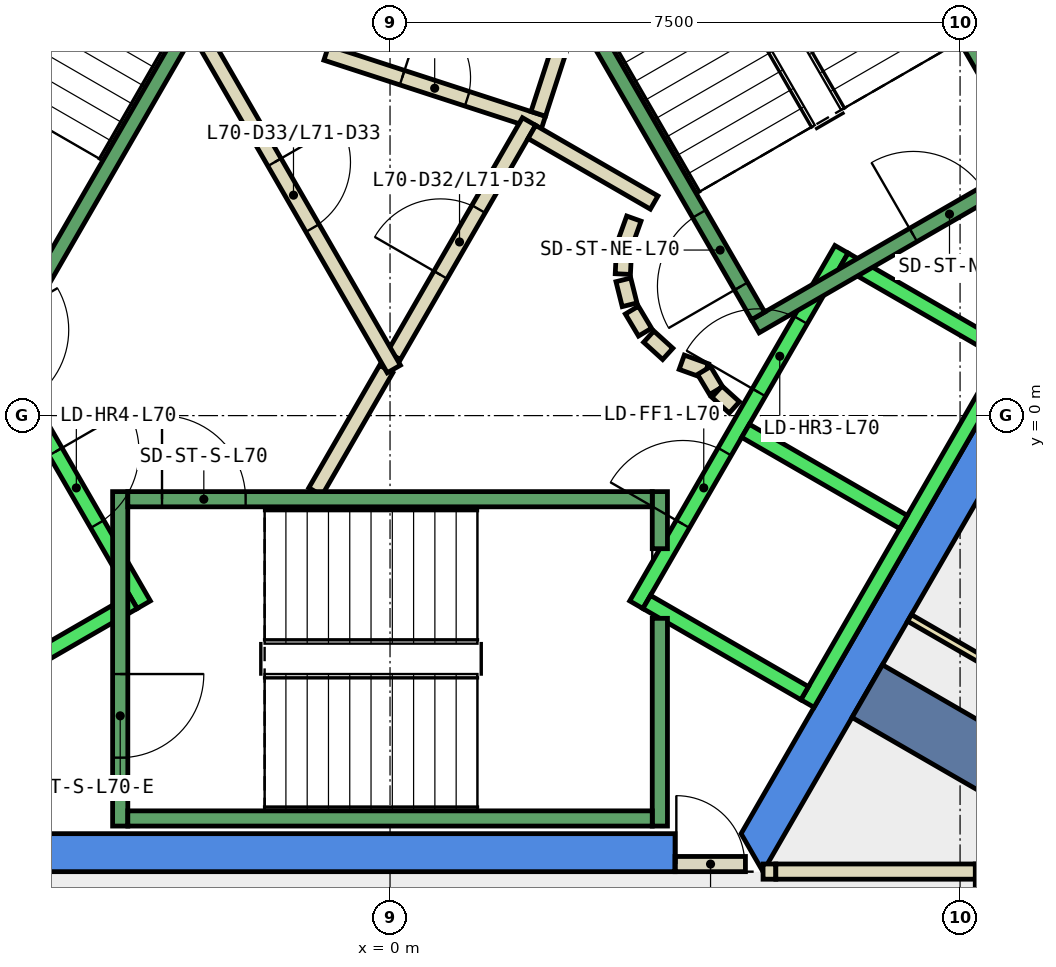
"""IFC4 building model, lengths in metres.
Left out: names, types, materials, properties, quantities, classifications, styles, units other than length and angle.
Written with IfcOpenShell. Run it as: python <this file> out.ifc"""

import sys

from ifc_helpers import new_model, si_unit, direction, frame, frame_2d, origin, place, context, subcontext, project, spatial, polyline, rectangle, outline, extrude, element, fill, save


model = new_model("IFC4")
c1 = context("Model", 3, precision=1e-05, world=origin(), true_north=direction((0.0, 1.0)))
c2 = subcontext(c1, "Body", "Model", "MODEL_VIEW")
j1 = project(units=[si_unit("LENGTHUNIT", "METRE"), si_unit("PLANEANGLEUNIT", "RADIAN")], contexts=[c1])
p1 = place(None, origin())
s1 = spatial("IfcSite", under=j1, at=p1, CompositionType="ELEMENT")
p2 = place(p1, origin())
s2 = spatial("IfcBuilding", under=s1, at=p2, CompositionType="ELEMENT")
p3 = place(p2, frame((0.0, 0.0, 300.8)))
s3 = spatial("IfcBuildingStorey", under=s2, at=p3, CompositionType="ELEMENT", Elevation=300.8)
p4 = place(p3, frame((0.0, 0.0, -0.34)))
e1 = element("IfcWall", 1, at=p4, inside=s3, PredefinedType="SHEAR", context=c2, shape_type="SweptSolid", body=[
    extrude(outline(polyline([(5.486, 9.998), (5.053, 9.748), (9.238, 2.5), (9.815, 2.5), (5.486, 9.998)])), origin(), (0.0, 0.0, 1.0), 3.6),
])
p5 = place(p3, frame((0.0, 0.0, -0.34)))
e2 = element("IfcWall", 2, at=p5, inside=s3, PredefinedType="SHEAR", context=c2, shape_type="SweptSolid", body=[
    extrude(outline(polyline([(3.75, -6.0), (3.75, -5.5), (-4.619, -5.5), (-4.907, -6.0), (3.75, -6.0)])), origin(), (0.0, 0.0, 1.0), 3.6),
])
p6 = place(p3, frame((0.0, 0.0, -0.34)))
e3 = element("IfcWall", 3, at=p6, inside=s3, PredefinedType="SHEAR", context=c2, shape_type="SweptSolid", body=[
    extrude(outline(polyline([(4.907, -6.0), (9.815, 2.5), (9.238, 2.5), (4.619, -5.5), (4.907, -6.0)])), origin(), (0.0, 0.0, 1.0), 3.6),
])
p7 = place(p3, frame((6.279, -3.625, -0.34), z_axis=(0.0, 0.0, 1.0), x_axis=(0.866017533419, -0.500013631625, 0.0)))
e4 = element("IfcWall", 4, at=p7, inside=s3, PredefinedType="SHEAR", context=c2, shape_type="SweptSolid", body=[
    extrude(rectangle(XDim=9.0, YDim=0.8, at=frame_2d((4.5, 0.0))), origin(), (0.0, 0.0, 1.0), 3.6),
])
p8 = place(p3, frame((-0.839, 4.771, 0.0), z_axis=(0.0, 0.0, 1.0), x_axis=(0.950961084355, -0.309310549515, 0.0)))
e5 = element("IfcWall", 5, at=p8, inside=s3, PredefinedType="PARTITIONING", context=c2, shape_type="SweptSolid", body=[
    extrude(rectangle(XDim=3.0, YDim=0.2, at=frame_2d((1.5, 0.0))), origin(), (0.0, 0.0, 1.0), 3.26),
])
p9 = place(p8, frame((1.05, 0.0, 0.0)))
e6 = element("IfcOpeningElement", 6, at=p9, cuts=e5, PredefinedType="OPENING", context=c2, shape_type="SweptSolid", body=[
    extrude(rectangle(XDim=0.9, YDim=2.1, at=frame_2d((0.45, 1.05))), frame((0.0, 0.11, 0.0), z_axis=(0.0, -1.0, 0.0), x_axis=(1.0, 0.0, 0.0)), (0.0, 0.0, 1.0), 0.22),
])
p10 = place(p3, frame((1.95, 3.97, 0.0), z_axis=(0.0, 0.0, 1.0), x_axis=(0.308583003896, 0.951197418892, 0.0)))
e7 = element("IfcWall", 7, at=p10, inside=s3, PredefinedType="PARTITIONING", context=c2, shape_type="SweptSolid", body=[
    extrude(rectangle(XDim=1.449, YDim=0.2, at=frame_2d((0.724, 0.0))), origin(), (0.0, 0.0, 1.0), 3.26),
])
p11 = place(p3, frame((-0.982, -1.0, 0.0), z_axis=(0.0, 0.0, 1.0), x_axis=(0.50024047865, 0.865886518847, 0.0)))
e8 = element("IfcWall", 8, at=p11, inside=s3, PredefinedType="PARTITIONING", context=c2, shape_type="SweptSolid", body=[
    extrude(rectangle(XDim=1.863, YDim=0.2, at=frame_2d((0.931, 0.0))), origin(), (0.0, 0.0, 1.0), 3.26),
])
p12 = place(p3, frame((0.05, 0.787, 0.0), z_axis=(0.0, 0.0, 1.0), x_axis=(0.499954076797, 0.866051915934, 0.0)))
e9 = element("IfcWall", 9, at=p12, inside=s3, PredefinedType="PARTITIONING", context=c2, shape_type="SweptSolid", body=[
    extrude(rectangle(XDim=3.558, YDim=0.2, at=frame_2d((1.779, 0.0))), origin(), (0.0, 0.0, 1.0), 3.26),
])
p13 = place(p12, frame((1.229, 0.0, 0.0)))
e10 = element("IfcOpeningElement", 10, at=p13, cuts=e9, PredefinedType="OPENING", context=c2, shape_type="SweptSolid", body=[
    extrude(rectangle(XDim=1.0, YDim=2.1, at=frame_2d((0.5, 1.05))), frame((0.0, 0.11, 0.0), z_axis=(0.0, -1.0, 0.0), x_axis=(1.0, 0.0, 0.0)), (0.0, 0.0, 1.0), 0.22),
])
p14 = place(p3, frame((1.866, 3.732, 0.0), z_axis=(0.0, 0.0, 1.0), x_axis=(0.866043361281, -0.499968895414, 0.0)))
e11 = element("IfcWall", 11, at=p14, inside=s3, PredefinedType="PARTITIONING", context=c2, shape_type="SweptSolid", body=[
    extrude(rectangle(XDim=1.858, YDim=0.2, at=frame_2d((0.929, 0.0))), origin(), (0.0, 0.0, 1.0), 3.26),
])
p15 = place(p3, frame((3.208, 2.592, 0.0), z_axis=(0.0, 0.0, 1.0), x_axis=(-0.337388820924, -0.941365382578, 0.0)))
e12 = element("IfcWall", 12, at=p15, inside=s3, PredefinedType="PARTITIONING", context=c2, shape_type="SweptSolid", body=[
    extrude(rectangle(XDim=0.338, YDim=0.2, at=frame_2d((0.169, 0.0))), origin(), (0.0, 0.0, 1.0), 3.26),
])
p16 = place(p3, frame((3.079, 2.199, 0.0), z_axis=(0.0, 0.0, 1.0), x_axis=(-0.047771483479, -0.998858290933, 0.0)))
e13 = element("IfcWall", 13, at=p16, inside=s3, PredefinedType="PARTITIONING", context=c2, shape_type="SweptSolid", body=[
    extrude(rectangle(XDim=0.337, YDim=0.2, at=frame_2d((0.169, 0.0))), origin(), (0.0, 0.0, 1.0), 3.26),
])
p17 = place(p3, frame((3.07, 1.786, 0.0), z_axis=(0.0, 0.0, 1.0), x_axis=(0.242705583207, -0.970099994784, 0.0)))
e14 = element("IfcWall", 14, at=p17, inside=s3, PredefinedType="PARTITIONING", context=c2, shape_type="SweptSolid", body=[
    extrude(rectangle(XDim=0.338, YDim=0.2, at=frame_2d((0.169, 0.0))), origin(), (0.0, 0.0, 1.0), 3.26),
])
for number, where, z_axis, x_axis in (
    (15, (3.182, 1.388, 0.0), (0.0, 0.0, 1.0), (0.512, -0.859, 0.0)),
    (16, (3.404, 1.039, 0.0), (0.0, 0.0, 1.0), (0.74, -0.672, 0.0)),
):
    element("IfcWall", number, at=place(p3, frame(where, z_axis=z_axis, x_axis=x_axis)), inside=s3, PredefinedType="PARTITIONING", context=c2, shape_type="SweptSolid", body=[
        extrude(rectangle(XDim=0.338, YDim=0.2, at=frame_2d((0.169, 0.0))), origin(), (0.0, 0.0, 1.0), 3.26),
    ])
p18 = place(p3, frame((3.838, 0.702, 0.0), z_axis=(0.0, 0.0, 1.0), x_axis=(0.941035081519, -0.338308993895, 0.0)))
e17 = element("IfcWall", 17, at=p18, inside=s3, PredefinedType="PARTITIONING", context=c2, shape_type="SweptSolid", body=[
    extrude(rectangle(XDim=0.337, YDim=0.2, at=frame_2d((0.168, 0.0))), origin(), (0.0, 0.0, 1.0), 3.26),
])
p19 = place(p3, frame((4.132, 0.593, 0.0), z_axis=(0.0, 0.0, 1.0), x_axis=(0.513561617048, -0.858052717201, 0.0)))
e18 = element("IfcWall", 18, at=p19, inside=s3, PredefinedType="PARTITIONING", context=c2, shape_type="SweptSolid", body=[
    extrude(rectangle(XDim=0.308, YDim=0.2, at=frame_2d((0.154, 0.0))), origin(), (0.0, 0.0, 1.0), 3.26),
])
p20 = place(p3, frame((4.301, 0.315, 0.0), z_axis=(0.0, 0.0, 1.0), x_axis=(0.741798017506, -0.670623367639, 0.0)))
e19 = element("IfcWall", 19, at=p20, inside=s3, PredefinedType="PARTITIONING", context=c2, shape_type="SweptSolid", body=[
    extrude(rectangle(XDim=0.309, YDim=0.2, at=frame_2d((0.154, 0.0))), origin(), (0.0, 0.0, 1.0), 3.26),
])
p21 = place(p3, frame((-2.54, 5.1, 0.0), z_axis=(0.0, 0.0, 1.0), x_axis=(0.499925051871, -0.866068670783, 0.0)))
e20 = element("IfcWall", 20, at=p21, inside=s3, PredefinedType="PARTITIONING", context=c2, shape_type="SweptSolid", body=[
    extrude(rectangle(XDim=5.181, YDim=0.2, at=frame_2d((2.59, 0.0))), origin(), (0.0, 0.0, 1.0), 3.26),
])
p22 = place(p21, frame((2.04, 0.0, 0.0)))
e21 = element("IfcOpeningElement", 21, at=p22, cuts=e20, PredefinedType="OPENING", context=c2, shape_type="SweptSolid", body=[
    extrude(rectangle(XDim=1.0, YDim=2.1, at=frame_2d((0.5, 1.05))), frame((0.0, 0.11, 0.0), z_axis=(0.0, -1.0, 0.0), x_axis=(1.0, 0.0, 0.0)), (0.0, 0.0, 1.0), 0.22),
])
p23 = place(p3, frame((4.908, -5.999, 0.0), z_axis=(0.0, 0.0, 1.0), x_axis=(1.0, 0.0, 0.0)))
e22 = element("IfcWall", 22, at=p23, inside=s3, PredefinedType="PARTITIONING", context=c2, shape_type="SweptSolid", body=[
    extrude(rectangle(XDim=0.168, YDim=0.2, at=frame_2d((0.084, 0.0))), origin(), (0.0, 0.0, 1.0), 2.4),
])
p24 = place(p3, frame((7.8, -5.899, 0.0), z_axis=(0.0, 0.0, 1.0), x_axis=(0.0, -1.0, 0.0)))
e23 = element("IfcWall", 23, at=p24, inside=s3, PredefinedType="PARTITIONING", context=c2, shape_type="SweptSolid", body=[
    extrude(rectangle(XDim=4.66, YDim=0.2, at=frame_2d((2.33, 0.0))), origin(), (0.0, 0.0, 1.0), 3.26),
])
p25 = place(p3, frame((6.835, -2.662, 0.0), z_axis=(0.0, 0.0, 1.0), x_axis=(0.866023427642, -0.500003422764, 0.0)))
e24 = element("IfcWall", 24, at=p25, inside=s3, PredefinedType="PARTITIONING", context=c2, shape_type="SweptSolid", body=[
    extrude(rectangle(XDim=8.65, YDim=0.1, at=frame_2d((4.325, 0.0))), origin(), (0.0, 0.0, 1.0), 3.26),
])
p26 = place(p3, frame((3.75, -5.9, 0.0), z_axis=(0.0, 0.0, 1.0), x_axis=(1.0, 0.0, 0.0)))
e25 = element("IfcWall", 25, at=p26, inside=s3, PredefinedType="PARTITIONING", context=c2, shape_type="SweptSolid", body=[
    extrude(rectangle(XDim=0.926, YDim=0.2, at=frame_2d((0.463, 0.0))), origin(), (0.0, 0.0, 1.0), 2.4),
])
p27 = place(p26, frame((0.017, 0.0, 0.0)))
e26 = element("IfcOpeningElement", 26, at=p27, cuts=e25, PredefinedType="OPENING", context=c2, shape_type="SweptSolid", body=[
    extrude(rectangle(XDim=0.9, YDim=2.1, at=frame_2d((0.45, 1.05))), frame((0.0, 0.11, 0.0), z_axis=(0.0, -1.0, 0.0), x_axis=(1.0, 0.0, 0.0)), (0.0, 0.0, 1.0), 0.22),
])
p28 = place(p3, frame((5.076, -5.999, 0.0), z_axis=(0.0, 0.0, 1.0), x_axis=(1.0, 0.0, 0.0)))
e27 = element("IfcWall", 27, at=p28, inside=s3, PredefinedType="PARTITIONING", context=c2, shape_type="SweptSolid", body=[
    extrude(rectangle(XDim=2.624, YDim=0.2, at=frame_2d((1.312, 0.0))), origin(), (0.0, 0.0, 1.0), 3.26),
])
p29 = place(p3, frame((-5.94, 2.188, 0.0), z_axis=(0.0, 0.0, 1.0), x_axis=(0.500034260056, -0.866005622828, 0.0)))
e28 = element("IfcWall", 28, at=p29, inside=s3, PredefinedType="STANDARD", context=c2, shape_type="SweptSolid", body=[
    extrude(rectangle(XDim=5.399, YDim=0.2, at=frame_2d((2.7, 0.0))), origin(), (0.0, 0.0, 1.0), 3.26),
])
p30 = place(p29, frame((3.075, 0.0, 0.0)))
e29 = element("IfcOpeningElement", 29, at=p30, cuts=e28, PredefinedType="OPENING", context=c2, shape_type="SweptSolid", body=[
    extrude(rectangle(XDim=1.1, YDim=2.1, at=frame_2d((0.55, 1.05))), frame((0.0, 0.11, 0.0), z_axis=(0.0, -1.0, 0.0), x_axis=(1.0, 0.0, 0.0)), (0.0, 0.0, 1.0), 0.22),
])
p31 = place(p29, frame((1.225, 0.0, 0.0)))
e30 = element("IfcOpeningElement", 30, at=p31, cuts=e28, PredefinedType="OPENING", context=c2, shape_type="SweptSolid", body=[
    extrude(rectangle(XDim=1.1, YDim=2.1, at=frame_2d((0.55, 1.05))), frame((0.0, 0.11, 0.0), z_axis=(0.0, -1.0, 0.0), x_axis=(1.0, 0.0, 0.0)), (0.0, 0.0, 1.0), 0.22),
])
p32 = place(p3, frame((-3.377, -2.452, 0.0), z_axis=(0.0, 0.0, 1.0), x_axis=(-0.865955154139, -0.50012165622, 0.0)))
e31 = element("IfcWall", 31, at=p32, inside=s3, PredefinedType="STANDARD", context=c2, shape_type="SweptSolid", body=[
    extrude(rectangle(XDim=2.4, YDim=0.2, at=frame_2d((1.2, 0.0))), origin(), (0.0, 0.0, 1.0), 3.26),
])
p33 = place(p3, frame((3.24, -2.488, 0.0), z_axis=(0.0, 0.0, 1.0), x_axis=(0.500034260056, 0.866005622828, 0.0)))
e32 = element("IfcWall", 32, at=p33, inside=s3, PredefinedType="STANDARD", context=c2, shape_type="SweptSolid", body=[
    extrude(rectangle(XDim=5.399, YDim=0.2, at=frame_2d((2.7, 0.0))), origin(), (0.0, 0.0, 1.0), 3.26),
])
p34 = place(p33, frame((3.225, 0.0, 0.0)))
e33 = element("IfcOpeningElement", 33, at=p34, cuts=e32, PredefinedType="OPENING", context=c2, shape_type="SweptSolid", body=[
    extrude(rectangle(XDim=1.1, YDim=2.1, at=frame_2d((0.55, 1.05))), frame((0.0, 0.11, 0.0), z_axis=(0.0, -1.0, 0.0), x_axis=(1.0, 0.0, 0.0)), (0.0, 0.0, 1.0), 0.22),
])
p35 = place(p33, frame((1.225, 0.0, 0.0)))
e34 = element("IfcOpeningElement", 34, at=p35, cuts=e32, PredefinedType="OPENING", context=c2, shape_type="SweptSolid", body=[
    extrude(rectangle(XDim=1.1, YDim=2.1, at=frame_2d((0.55, 1.05))), frame((0.0, 0.11, 0.0), z_axis=(0.0, -1.0, 0.0), x_axis=(1.0, 0.0, 0.0)), (0.0, 0.0, 1.0), 0.22),
])
p36 = place(p3, frame((5.492, -3.788, 0.0), z_axis=(0.0, 0.0, 1.0), x_axis=(0.500034260056, 0.866005622828, 0.0)))
e35 = element("IfcWall", 35, at=p36, inside=s3, PredefinedType="STANDARD", context=c2, shape_type="SweptSolid", body=[
    extrude(rectangle(XDim=5.399, YDim=0.2, at=frame_2d((2.7, 0.0))), origin(), (0.0, 0.0, 1.0), 3.26),
])
p37 = place(p3, frame((3.377, -2.452, 0.0), z_axis=(0.0, 0.0, 1.0), x_axis=(0.865955154139, -0.50012165622, 0.0)))
e36 = element("IfcWall", 36, at=p37, inside=s3, PredefinedType="STANDARD", context=c2, shape_type="SweptSolid", body=[
    extrude(rectangle(XDim=2.4, YDim=0.2, at=frame_2d((1.2, 0.0))), origin(), (0.0, 0.0, 1.0), 3.26),
])
for number, where, z_axis, x_axis in (
    (37, (4.677, -0.2, 0.0), (0.0, 0.0, 1.0), (0.866, -0.5, 0.0)),
    (38, (5.977, 2.052, 0.0), (0.0, 0.0, 1.0), (0.866, -0.5, 0.0)),
):
    element("IfcWall", number, at=place(p3, frame(where, z_axis=z_axis, x_axis=x_axis)), inside=s3, PredefinedType="STANDARD", context=c2, shape_type="SweptSolid", body=[
        extrude(rectangle(XDim=2.399, YDim=0.2, at=frame_2d((1.2, 0.0))), origin(), (0.0, 0.0, 1.0), 3.26),
    ])
p38 = place(p3, frame((-3.55, -1.0, 0.0), z_axis=(0.0, 0.0, 1.0), x_axis=(0.0, -1.0, 0.0)))
e39 = element("IfcWall", 39, at=p38, inside=s3, PredefinedType="STANDARD", context=c2, shape_type="SweptSolid", body=[
    extrude(rectangle(XDim=4.4, YDim=0.2, at=frame_2d((2.2, 0.0))), origin(), (0.0, 0.0, 1.0), 3.26),
])
p39 = place(p38, frame((2.4, 0.0, 0.0)))
e40 = element("IfcOpeningElement", 40, at=p39, cuts=e39, PredefinedType="OPENING", context=c2, shape_type="SweptSolid", body=[
    extrude(rectangle(XDim=1.1, YDim=2.2, at=frame_2d((0.55, 1.1))), frame((0.0, 0.11, 0.0), z_axis=(0.0, -1.0, 0.0), x_axis=(1.0, 0.0, 0.0)), (0.0, 0.0, 1.0), 0.22),
])
p40 = place(p3, frame((3.55, -2.667, 0.0), z_axis=(0.0, 0.0, 1.0), x_axis=(0.0, -1.0, 0.0)))
e41 = element("IfcWall", 41, at=p40, inside=s3, PredefinedType="STANDARD", context=c2, shape_type="SweptSolid", body=[
    extrude(rectangle(XDim=2.733, YDim=0.2, at=frame_2d((1.366, 0.0))), origin(), (0.0, 0.0, 1.0), 3.26),
])
p41 = place(p3, frame((3.55, -1.0, 0.0), z_axis=(0.0, 0.0, 1.0), x_axis=(0.0, -1.0, 0.0)))
e42 = element("IfcWall", 42, at=p41, inside=s3, PredefinedType="STANDARD", context=c2, shape_type="SweptSolid", body=[
    extrude(rectangle(XDim=0.751, YDim=0.2, at=frame_2d((0.375, 0.0))), origin(), (0.0, 0.0, 1.0), 3.26),
])
p42 = place(p3, frame((-3.45, -1.1, 0.0), z_axis=(0.0, 0.0, 1.0), x_axis=(1.0, 0.0, 0.0)))
e43 = element("IfcWall", 43, at=p42, inside=s3, PredefinedType="STANDARD", context=c2, shape_type="SweptSolid", body=[
    extrude(rectangle(XDim=6.9, YDim=0.2, at=frame_2d((3.45, 0.0))), origin(), (0.0, 0.0, 1.0), 3.26),
])
p43 = place(p42, frame((0.45, 0.0, 0.0)))
e44 = element("IfcOpeningElement", 44, at=p43, cuts=e43, PredefinedType="OPENING", context=c2, shape_type="SweptSolid", body=[
    extrude(rectangle(XDim=1.1, YDim=2.2, at=frame_2d((0.55, 1.1))), frame((0.0, 0.11, 0.0), z_axis=(0.0, -1.0, 0.0), x_axis=(1.0, 0.0, 0.0)), (0.0, 0.0, 1.0), 0.22),
])
p44 = place(p3, frame((-3.45, -5.3, 0.0), z_axis=(0.0, 0.0, 1.0), x_axis=(1.0, 0.0, 0.0)))
e45 = element("IfcWall", 45, at=p44, inside=s3, PredefinedType="STANDARD", context=c2, shape_type="SweptSolid", body=[
    extrude(rectangle(XDim=6.9, YDim=0.2, at=frame_2d((3.45, 0.0))), origin(), (0.0, 0.0, 1.0), 3.26),
])
p45 = place(p3, frame((4.806, 1.176, 0.0), z_axis=(0.0, 0.0, 1.0), x_axis=(0.866059941101, 0.499940174841, 0.0)))
e46 = element("IfcWall", 46, at=p45, inside=s3, PredefinedType="STANDARD", context=c2, shape_type="SweptSolid", body=[
    extrude(rectangle(XDim=4.4, YDim=0.2, at=frame_2d((2.2, 0.0))), origin(), (0.0, 0.0, 1.0), 3.26),
])
p46 = place(p45, frame((2.4, 0.0, 0.0)))
e47 = element("IfcOpeningElement", 47, at=p46, cuts=e46, PredefinedType="OPENING", context=c2, shape_type="SweptSolid", body=[
    extrude(rectangle(XDim=1.1, YDim=2.2, at=frame_2d((0.55, 1.1))), frame((0.0, 0.11, 0.0), z_axis=(0.0, -1.0, 0.0), x_axis=(1.0, 0.0, 0.0)), (0.0, 0.0, 1.0), 0.22),
])
p47 = place(p3, frame((4.843, 1.312, 0.0), z_axis=(0.0, 0.0, 1.0), x_axis=(-0.499963383562, 0.866046543262, 0.0)))
e48 = element("IfcWall", 48, at=p47, inside=s3, PredefinedType="STANDARD", context=c2, shape_type="SweptSolid", body=[
    extrude(rectangle(XDim=6.9, YDim=0.2, at=frame_2d((3.45, 0.0))), origin(), (0.0, 0.0, 1.0), 3.26),
])
p48 = place(p47, frame((0.45, 0.0, 0.0)))
e49 = element("IfcOpeningElement", 49, at=p48, cuts=e48, PredefinedType="OPENING", context=c2, shape_type="SweptSolid", body=[
    extrude(rectangle(XDim=1.1, YDim=2.2, at=frame_2d((0.55, 1.1))), frame((0.0, 0.11, 0.0), z_axis=(0.0, -1.0, 0.0), x_axis=(1.0, 0.0, 0.0)), (0.0, 0.0, 1.0), 0.22),
])
p49 = place(p3, frame((8.48, 3.412, 0.0), z_axis=(0.0, 0.0, 1.0), x_axis=(-0.499978703459, 0.866037698999, 0.0)))
e50 = element("IfcWall", 50, at=p49, inside=s3, PredefinedType="STANDARD", context=c2, shape_type="SweptSolid", body=[
    extrude(rectangle(XDim=6.9, YDim=0.2, at=frame_2d((3.45, 0.0))), origin(), (0.0, 0.0, 1.0), 3.26),
])
p50 = place(p3, frame((-1.393, 7.288, 0.0), z_axis=(0.0, 0.0, 1.0), x_axis=(-0.499963383562, -0.866046543262, 0.0)))
e51 = element("IfcWall", 51, at=p50, inside=s3, PredefinedType="STANDARD", context=c2, shape_type="SweptSolid", body=[
    extrude(rectangle(XDim=6.9, YDim=0.2, at=frame_2d((3.45, 0.0))), origin(), (0.0, 0.0, 1.0), 3.26),
])
p51 = place(p50, frame((0.45, 0.0, 0.0)))
e52 = element("IfcOpeningElement", 52, at=p51, cuts=e51, PredefinedType="OPENING", context=c2, shape_type="SweptSolid", body=[
    extrude(rectangle(XDim=1.1, YDim=2.2, at=frame_2d((0.55, 1.1))), frame((0.0, 0.11, 0.0), z_axis=(0.0, -1.0, 0.0), x_axis=(1.0, 0.0, 0.0)), (0.0, 0.0, 1.0), 0.22),
])
p52 = place(p13, origin())
e53 = element("IfcDoor", 53, at=p52, inside=s3, OperationType="SINGLE_SWING_RIGHT", PredefinedType="DOOR", context=c2, shape_type="SweptSolid", body=[
    extrude(rectangle(XDim=1.0, YDim=2.1, at=frame_2d((0.5, 1.05))), frame((0.0, 0.025, 0.0), z_axis=(0.0, -1.0, 0.0), x_axis=(1.0, 0.0, 0.0)), (0.0, 0.0, 1.0), 0.05),
])
fill(e10, e53)
p53 = place(p22, origin())
e54 = element("IfcDoor", 54, at=p53, inside=s3, OperationType="SINGLE_SWING_RIGHT", PredefinedType="DOOR", context=c2, shape_type="SweptSolid", body=[
    extrude(rectangle(XDim=1.0, YDim=2.1, at=frame_2d((0.5, 1.05))), frame((0.0, 0.025, 0.0), z_axis=(0.0, -1.0, 0.0), x_axis=(1.0, 0.0, 0.0)), (0.0, 0.0, 1.0), 0.05),
])
fill(e21, e54)
p54 = place(p9, origin())
e55 = element("IfcDoor", 55, at=p54, inside=s3, OperationType="SINGLE_SWING_LEFT", PredefinedType="DOOR", context=c2, shape_type="SweptSolid", body=[
    extrude(rectangle(XDim=0.9, YDim=2.1, at=frame_2d((0.45, 1.05))), frame((0.0, 0.025, 0.0), z_axis=(0.0, -1.0, 0.0), x_axis=(1.0, 0.0, 0.0)), (0.0, 0.0, 1.0), 0.05),
])
fill(e6, e55)
p55 = place(p27, origin())
e56 = element("IfcDoor", 56, at=p55, inside=s3, OperationType="SINGLE_SWING_LEFT", PredefinedType="DOOR", context=c2, shape_type="SweptSolid", body=[
    extrude(rectangle(XDim=0.9, YDim=2.1, at=frame_2d((0.45, 1.05))), frame((0.0, 0.025, 0.0), z_axis=(0.0, -1.0, 0.0), x_axis=(1.0, 0.0, 0.0)), (0.0, 0.0, 1.0), 0.05),
])
fill(e26, e56)
p56 = place(p34, origin())
e57 = element("IfcDoor", 57, at=p56, inside=s3, OperationType="SLIDING_TO_LEFT", PredefinedType="DOOR", context=c2, shape_type="SweptSolid", body=[
    extrude(rectangle(XDim=1.1, YDim=2.1, at=frame_2d((0.55, 1.05))), frame((0.0, 0.025, 0.0), z_axis=(0.0, -1.0, 0.0), x_axis=(1.0, 0.0, 0.0)), (0.0, 0.0, 1.0), 0.05),
])
fill(e33, e57)
p57 = place(p30, origin())
e58 = element("IfcDoor", 58, at=p57, inside=s3, OperationType="SLIDING_TO_LEFT", PredefinedType="DOOR", context=c2, shape_type="SweptSolid", body=[
    extrude(rectangle(XDim=1.1, YDim=2.1, at=frame_2d((0.55, 1.05))), frame((0.0, 0.025, 0.0), z_axis=(0.0, -1.0, 0.0), x_axis=(1.0, 0.0, 0.0)), (0.0, 0.0, 1.0), 0.05),
])
fill(e29, e58)
p58 = place(p35, origin())
e59 = element("IfcDoor", 59, at=p58, inside=s3, OperationType="SLIDING_TO_LEFT", PredefinedType="DOOR", context=c2, shape_type="SweptSolid", body=[
    extrude(rectangle(XDim=1.1, YDim=2.1, at=frame_2d((0.55, 1.05))), frame((0.0, 0.025, 0.0), z_axis=(0.0, -1.0, 0.0), x_axis=(1.0, 0.0, 0.0)), (0.0, 0.0, 1.0), 0.05),
])
fill(e34, e59)
p59 = place(p43, origin())
e60 = element("IfcDoor", 60, at=p59, inside=s3, OperationType="SINGLE_SWING_LEFT", PredefinedType="DOOR", context=c2, shape_type="SweptSolid", body=[
    extrude(rectangle(XDim=1.1, YDim=2.2, at=frame_2d((0.55, 1.1))), frame((0.0, 0.025, 0.0), z_axis=(0.0, -1.0, 0.0), x_axis=(1.0, 0.0, 0.0)), (0.0, 0.0, 1.0), 0.05),
])
fill(e44, e60)
p60 = place(p39, origin())
e61 = element("IfcDoor", 61, at=p60, inside=s3, OperationType="SINGLE_SWING_LEFT", PredefinedType="DOOR", context=c2, shape_type="SweptSolid", body=[
    extrude(rectangle(XDim=1.1, YDim=2.2, at=frame_2d((0.55, 1.1))), frame((0.0, 0.025, 0.0), z_axis=(0.0, -1.0, 0.0), x_axis=(1.0, 0.0, 0.0)), (0.0, 0.0, 1.0), 0.05),
])
fill(e40, e61)
p61 = place(p48, origin())
e62 = element("IfcDoor", 62, at=p61, inside=s3, OperationType="SINGLE_SWING_LEFT", PredefinedType="DOOR", context=c2, shape_type="SweptSolid", body=[
    extrude(rectangle(XDim=1.1, YDim=2.2, at=frame_2d((0.55, 1.1))), frame((0.0, 0.025, 0.0), z_axis=(0.0, -1.0, 0.0), x_axis=(1.0, 0.0, 0.0)), (0.0, 0.0, 1.0), 0.05),
])
fill(e49, e62)
p62 = place(p46, origin())
e63 = element("IfcDoor", 63, at=p62, inside=s3, OperationType="SINGLE_SWING_LEFT", PredefinedType="DOOR", context=c2, shape_type="SweptSolid", body=[
    extrude(rectangle(XDim=1.1, YDim=2.2, at=frame_2d((0.55, 1.1))), frame((0.0, 0.025, 0.0), z_axis=(0.0, -1.0, 0.0), x_axis=(1.0, 0.0, 0.0)), (0.0, 0.0, 1.0), 0.05),
])
fill(e47, e63)
save(model, sys.argv[1])
